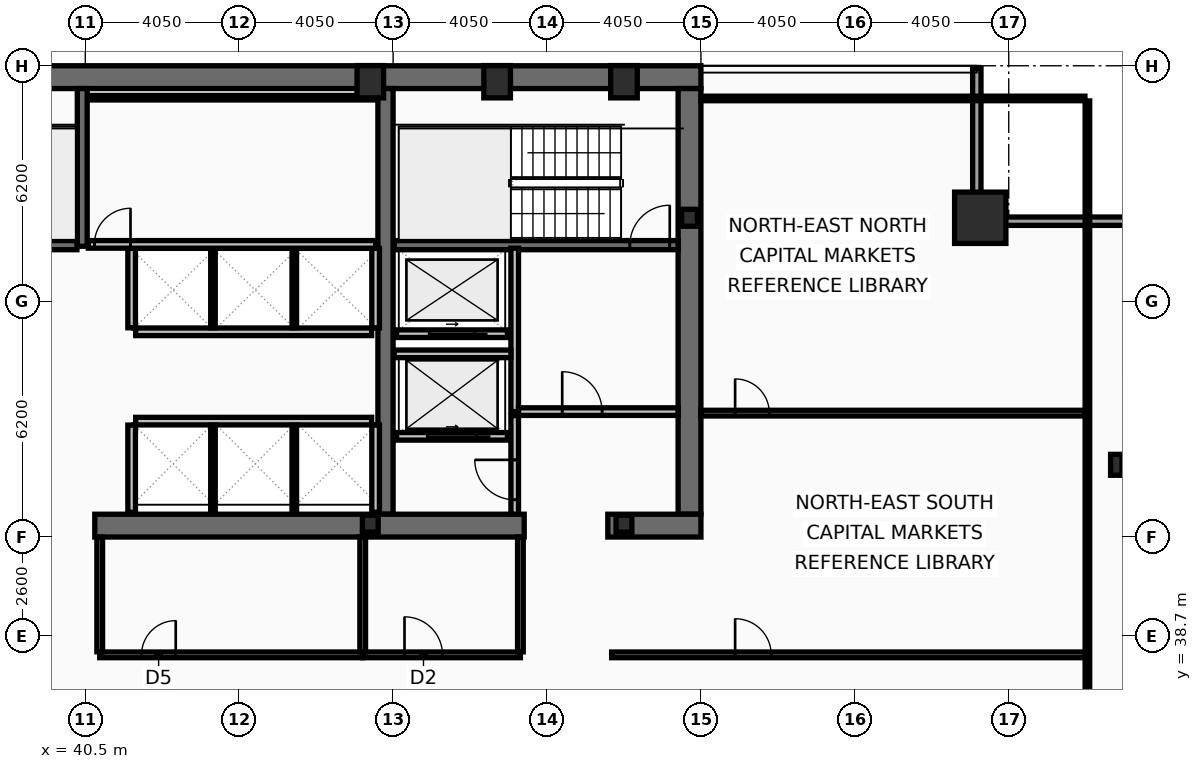
"""IFC4 building model, lengths in metres.
Left out: names, types, materials, properties, quantities, classifications, styles, units other than length and angle.
Written with IfcOpenShell. Run it as: python <this file> out.ifc"""

import sys

from ifc_helpers import new_model, si_unit, direction, frame, frame_2d, origin, origin_2d, place, context, subcontext, project, spatial, rectangle, hollow_rectangle, i_section, extrude, element, fill, save


model = new_model("IFC4")
c1 = context("Model", 3, precision=1e-05, world=origin(), true_north=direction((0.0, 1.0)))
c2 = subcontext(c1, "Body", "Model", "MODEL_VIEW")
j1 = project(units=[si_unit("LENGTHUNIT", "METRE"), si_unit("PLANEANGLEUNIT", "RADIAN")], contexts=[c1])
p1 = place(None, origin())
s1 = spatial("IfcSite", under=j1, at=p1, CompositionType="ELEMENT")
p2 = place(p1, origin())
s2 = spatial("IfcBuilding", under=s1, at=p2, CompositionType="ELEMENT")
p3 = place(p2, frame((0.0, 0.0, 177.0)))
s3 = spatial("IfcBuildingStorey", under=s2, at=p3, CompositionType="ELEMENT", Elevation=177.0)
p4 = place(p3, frame((16.2, 53.4, 0.0), z_axis=(0.0, 0.0, 1.0), x_axis=(1.0, 0.0, 0.0)))
e1 = element("IfcWall", 1, at=p4, inside=s3, PredefinedType="SHEAR", context=c2, shape_type="SweptSolid", body=[
    extrude(rectangle(XDim=40.5, YDim=0.6, at=frame_2d((20.25, 0.0))), origin(), (0.0, 0.0, 1.0), 3.44),
])
p5 = place(p3, frame((56.4, 53.1, 0.0), z_axis=(0.0, 0.0, 1.0), x_axis=(0.0, -1.0, 0.0)))
e2 = element("IfcWall", 2, at=p5, inside=s3, PredefinedType="SHEAR", context=c2, shape_type="SweptSolid", body=[
    extrude(rectangle(XDim=11.2, YDim=0.6, at=frame_2d((5.6, 0.0))), origin(), (0.0, 0.0, 1.0), 3.44),
])
p6 = place(p3, frame((48.4, 41.9, 0.0), z_axis=(0.0, 0.0, 1.0), x_axis=(0.0, 1.0, 0.0)))
e3 = element("IfcWall", 3, at=p6, inside=s3, PredefinedType="SHEAR", context=c2, shape_type="SweptSolid", body=[
    extrude(rectangle(XDim=11.2, YDim=0.4, at=frame_2d((5.6, 0.0))), origin(), (0.0, 0.0, 1.0), 3.44),
])
p7 = place(p3, frame((52.05, 41.6, 0.0), z_axis=(0.0, 0.0, 1.0), x_axis=(-1.0, 0.0, 0.0)))
e4 = element("IfcWall", 4, at=p7, inside=s3, PredefinedType="SHEAR", context=c2, shape_type="SweptSolid", body=[
    extrude(rectangle(XDim=11.3, YDim=0.6, at=frame_2d((5.65, 0.0))), origin(), (0.0, 0.0, 1.0), 3.44),
])
p8 = place(p3, frame((56.7, 41.6, 0.0), z_axis=(0.0, 0.0, 1.0), x_axis=(-1.0, 0.0, 0.0)))
e5 = element("IfcWall", 5, at=p8, inside=s3, PredefinedType="SHEAR", context=c2, shape_type="SweptSolid", body=[
    extrude(rectangle(XDim=2.45, YDim=0.6, at=frame_2d((1.225, 0.0))), origin(), (0.0, 0.0, 1.0), 3.44),
])
p9 = place(p3, frame((40.42, 48.95, 0.0), z_axis=(0.0, 0.0, 1.0), x_axis=(0.0, 1.0, 0.0)))
e6 = element("IfcWall", 6, at=p9, inside=s3, PredefinedType="SHEAR", context=c2, shape_type="SweptSolid", body=[
    extrude(rectangle(XDim=4.15, YDim=0.26, at=frame_2d((2.075, 0.0))), origin(), (0.0, 0.0, 1.0), 3.44),
])
p10 = place(p3, frame((48.63, 48.98, 0.0), z_axis=(0.0, 0.0, 1.0), x_axis=(1.0, 0.0, 0.0)))
e7 = element("IfcWall", 7, at=p10, inside=s3, PredefinedType="SHEAR", context=c2, shape_type="SweptSolid", body=[
    extrude(rectangle(XDim=7.47, YDim=0.24, at=frame_2d((3.735, 0.0))), origin(), (0.0, 0.0, 1.0), 3.44),
])
p11 = place(p10, frame((6.2, 0.0, 0.0)))
e8 = element("IfcOpeningElement", 8, at=p11, cuts=e7, PredefinedType="OPENING", context=c2, shape_type="SweptSolid", body=[
    extrude(rectangle(XDim=1.05, YDim=2.15, at=frame_2d((0.525, 1.075))), frame((0.0, 0.13, 0.0), z_axis=(0.0, -1.0, 0.0), x_axis=(1.0, 0.0, 0.0)), (0.0, 0.0, 1.0), 0.26),
])
p12 = place(p3, frame((32.72, 48.98, 0.0), z_axis=(0.0, 0.0, 1.0), x_axis=(1.0, 0.0, 0.0)))
e9 = element("IfcWall", 9, at=p12, inside=s3, PredefinedType="SHEAR", context=c2, shape_type="SweptSolid", body=[
    extrude(rectangle(XDim=7.56, YDim=0.24, at=frame_2d((3.78, 0.0))), origin(), (0.0, 0.0, 1.0), 3.44),
])
p13 = place(p12, frame((0.22, 0.0, 0.0)))
e10 = element("IfcOpeningElement", 10, at=p13, cuts=e9, PredefinedType="OPENING", context=c2, shape_type="SweptSolid", body=[
    extrude(rectangle(XDim=1.05, YDim=2.15, at=frame_2d((0.525, 1.075))), frame((0.0, 0.13, 0.0), z_axis=(0.0, -1.0, 0.0), x_axis=(1.0, 0.0, 0.0)), (0.0, 0.0, 1.0), 0.26),
])
p14 = place(p3, frame((64.05, 49.7, 0.0), z_axis=(0.0, 0.0, 1.0), x_axis=(1.0, 0.0, 0.0)))
e11 = element("IfcColumn", 11, at=p14, inside=s3, PredefinedType="COLUMN", context=c2, shape_type="SweptSolid", body=[
    extrude(hollow_rectangle(XDim=1.35, YDim=1.35, WallThickness=0.065, at=origin_2d()), origin(), (0.0, 0.0, 1.0), 3.6),
])
for number, where, z_axis, x_axis in (
    (12, (48.0, 53.28, 0.0), (0.0, 0.0, 1.0), (1.0, 0.0, 0.0)),
    (13, (51.337, 53.28, 0.0), (0.0, 0.0, 1.0), (1.0, 0.0, 0.0)),
    (14, (54.675, 53.28, 0.0), (0.0, 0.0, 1.0), (1.0, 0.0, 0.0)),
):
    element("IfcColumn", number, at=place(p3, frame(where, z_axis=z_axis, x_axis=x_axis)), inside=s3, PredefinedType="COLUMN", context=c2, shape_type="SweptSolid", body=[
        extrude(hollow_rectangle(XDim=0.7, YDim=0.85, WallThickness=0.05, at=origin_2d()), origin(), (0.0, 0.0, 1.0), 3.6),
    ])
p15 = place(p3, frame((67.63, 43.2, 0.0), z_axis=(0.0, 0.0, 1.0), x_axis=(1.0, 0.0, 0.0)))
e15 = element("IfcColumn", 15, at=p15, inside=s3, PredefinedType="COLUMN", context=c2, shape_type="SweptSolid", body=[
    extrude(i_section(OverallWidth=0.3, OverallDepth=0.55, WebThickness=0.015, FlangeThickness=0.029, at=origin_2d()), origin(), (0.0, 0.0, 1.0), 3.6),
])
for number, where, z_axis, x_axis in (
    (16, (56.4, 49.7, 0.0), (0.0, 0.0, 1.0), (1.0, 0.0, 0.0)),
    (17, (48.0, 41.65, 0.0), (0.0, 0.0, 1.0), (1.0, 0.0, 0.0)),
    (18, (54.675, 41.65, 0.0), (0.0, 0.0, 1.0), (1.0, 0.0, 0.0)),
):
    element("IfcColumn", number, at=place(p3, frame(where, z_axis=z_axis, x_axis=x_axis)), inside=s3, PredefinedType="COLUMN", context=c2, shape_type="SweptSolid", body=[
        extrude(i_section(OverallWidth=0.416, OverallDepth=0.446, WebThickness=0.039, FlangeThickness=0.063, at=origin_2d()), origin(), (0.0, 0.0, 1.0), 3.6),
    ])
p16 = place(p3, frame((63.96, 53.63, 0.0), z_axis=(0.0, 0.0, 1.0), x_axis=(0.0, -1.0, 0.0)))
e19 = element("IfcWall", 19, at=p16, inside=s3, PredefinedType="SOLIDWALL", context=c2, shape_type="SweptSolid", body=[
    extrude(rectangle(XDim=3.91, YDim=0.22, at=frame_2d((1.955, 0.0))), origin(), (0.0, 0.0, 1.0), 2.83),
])
p17 = place(p3, frame((63.85, 49.61, 0.0), z_axis=(0.0, 0.0, 1.0), x_axis=(1.0, 0.0, 0.0)))
e20 = element("IfcWall", 20, at=p17, inside=s3, PredefinedType="SOLIDWALL", context=c2, shape_type="SweptSolid", body=[
    extrude(rectangle(XDim=4.22, YDim=0.22, at=frame_2d((2.11, 0.0))), origin(), (0.0, 0.0, 1.0), 2.83),
])
p18 = place(p3, frame((51.61, 43.95, 0.0), z_axis=(0.0, 0.0, 1.0), x_axis=(-1.0, 0.0, 0.0)))
e21 = element("IfcWall", 21, at=p18, inside=s3, PredefinedType="PARTITIONING", context=c2, shape_type="SweptSolid", body=[
    extrude(rectangle(XDim=2.92, YDim=0.2, at=frame_2d((1.46, 0.0))), origin(), (0.0, 0.0, 1.0), 3.44),
])
p19 = place(p18, frame((0.81, 0.0, 0.0)))
e22 = element("IfcOpeningElement", 22, at=p19, cuts=e21, PredefinedType="OPENING", context=c2, shape_type="SweptSolid", body=[
    extrude(rectangle(XDim=1.3, YDim=2.18, at=frame_2d((0.65, 1.09))), frame((0.0, 0.11, 0.0), z_axis=(0.0, -1.0, 0.0), x_axis=(1.0, 0.0, 0.0)), (0.0, 0.0, 1.0), 0.22),
])
p20 = place(p3, frame((51.61, 46.65, 0.0), z_axis=(0.0, 0.0, 1.0), x_axis=(-1.0, 0.0, 0.0)))
e23 = element("IfcWall", 23, at=p20, inside=s3, PredefinedType="PARTITIONING", context=c2, shape_type="SweptSolid", body=[
    extrude(rectangle(XDim=2.92, YDim=0.2, at=frame_2d((1.46, 0.0))), origin(), (0.0, 0.0, 1.0), 3.44),
])
p21 = place(p20, frame((0.86, 0.0, 0.0)))
e24 = element("IfcOpeningElement", 24, at=p21, cuts=e23, PredefinedType="OPENING", context=c2, shape_type="SweptSolid", body=[
    extrude(rectangle(XDim=1.2, YDim=2.18, at=frame_2d((0.6, 1.09))), frame((0.0, 0.11, 0.0), z_axis=(0.0, -1.0, 0.0), x_axis=(1.0, 0.0, 0.0)), (0.0, 0.0, 1.0), 0.22),
])
p22 = place(p3, frame((51.8, 44.6, 0.0), z_axis=(0.0, 0.0, 1.0), x_axis=(0.0, 1.0, 0.0)))
e25 = element("IfcWall", 25, at=p22, inside=s3, PredefinedType="PARTITIONING", context=c2, shape_type="SweptSolid", body=[
    extrude(rectangle(XDim=4.3, YDim=0.2, at=frame_2d((2.15, 0.0))), origin(), (0.0, 0.0, 1.0), 3.44),
])
p23 = place(p3, frame((51.9, 44.6, 0.0), z_axis=(0.0, 0.0, 1.0), x_axis=(1.0, 0.0, 0.0)))
e26 = element("IfcWall", 26, at=p23, inside=s3, PredefinedType="PARTITIONING", context=c2, shape_type="SweptSolid", body=[
    extrude(rectangle(XDim=4.2, YDim=0.2, at=frame_2d((2.1, 0.0))), origin(), (0.0, 0.0, 1.0), 3.44),
])
p24 = place(p23, frame((1.15, 0.0, 0.0)))
e27 = element("IfcOpeningElement", 27, at=p24, cuts=e26, PredefinedType="OPENING", context=c2, shape_type="SweptSolid", body=[
    extrude(rectangle(XDim=1.05, YDim=2.15, at=frame_2d((0.525, 1.075))), frame((0.0, 0.11, 0.0), z_axis=(0.0, -1.0, 0.0), x_axis=(1.0, 0.0, 0.0)), (0.0, 0.0, 1.0), 0.22),
])
p25 = place(p3, frame((48.63, 46.12, 0.0), z_axis=(0.0, 0.0, 1.0), x_axis=(1.0, 0.0, 0.0)))
e28 = element("IfcWall", 28, at=p25, inside=s3, PredefinedType="PARTITIONING", context=c2, shape_type="SweptSolid", body=[
    extrude(rectangle(XDim=3.07, YDim=0.2, at=frame_2d((1.535, 0.0))), origin(), (0.0, 0.0, 1.0), 3.44),
])
p26 = place(p3, frame((51.8, 41.9, 0.0), z_axis=(0.0, 0.0, 1.0), x_axis=(0.0, 1.0, 0.0)))
e29 = element("IfcWall", 29, at=p26, inside=s3, PredefinedType="PARTITIONING", context=c2, shape_type="SweptSolid", body=[
    extrude(rectangle(XDim=2.595, YDim=0.2, at=frame_2d((1.298, 0.0))), origin(), (0.0, 0.0, 1.0), 3.44),
])
p27 = place(p26, frame((0.38, 0.0, 0.0)))
e30 = element("IfcOpeningElement", 30, at=p27, cuts=e29, PredefinedType="OPENING", context=c2, shape_type="SweptSolid", body=[
    extrude(rectangle(XDim=1.05, YDim=2.15, at=frame_2d((0.525, 1.075))), frame((0.0, 0.11, 0.0), z_axis=(0.0, -1.0, 0.0), x_axis=(1.0, 0.0, 0.0)), (0.0, 0.0, 1.0), 0.22),
])
p28 = place(p3, frame((41.825, 46.7, 0.0), z_axis=(0.0, 0.0, 1.0), x_axis=(1.0, 0.0, 0.0)))
e31 = element("IfcWall", 31, at=p28, inside=s3, PredefinedType="PARTITIONING", context=c2, shape_type="SweptSolid", body=[
    extrude(rectangle(XDim=6.21, YDim=0.2, at=frame_2d((3.105, 0.0))), origin(), (0.0, 0.0, 1.0), 3.44),
])
for number, where, z_axis, x_axis in (
    (32, (41.72, 46.805, 0.0), (0.0, 0.0, 1.0), (0.0, 1.0, 0.0)),
    (33, (48.14, 46.805, 0.0), (0.0, 0.0, 1.0), (0.0, 1.0, 0.0)),
):
    element("IfcWall", number, at=place(p3, frame(where, z_axis=z_axis, x_axis=x_axis)), inside=s3, PredefinedType="PARTITIONING", context=c2, shape_type="SweptSolid", body=[
        extrude(rectangle(XDim=2.09, YDim=0.2, at=frame_2d((1.045, 0.0))), origin(), (0.0, 0.0, 1.0), 3.44),
    ])
for number, where, z_axis, x_axis in (
    (34, (43.86, 46.805, 0.0), (0.0, 0.0, 1.0), (0.0, 1.0, 0.0)),
    (35, (46.0, 46.805, 0.0), (0.0, 0.0, 1.0), (0.0, 1.0, 0.0)),
):
    element("IfcWall", number, at=place(p3, frame(where, z_axis=z_axis, x_axis=x_axis)), inside=s3, PredefinedType="PARTITIONING", context=c2, shape_type="SweptSolid", body=[
        extrude(rectangle(XDim=2.09, YDim=0.12, at=frame_2d((1.045, 0.0))), origin(), (0.0, 0.0, 1.0), 3.44),
    ])
p29 = place(p3, frame((41.825, 44.35, 0.0), z_axis=(0.0, 0.0, 1.0), x_axis=(1.0, 0.0, 0.0)))
e36 = element("IfcWall", 36, at=p29, inside=s3, PredefinedType="PARTITIONING", context=c2, shape_type="SweptSolid", body=[
    extrude(rectangle(XDim=6.21, YDim=0.2, at=frame_2d((3.105, 0.0))), origin(), (0.0, 0.0, 1.0), 3.44),
])
for number, where, z_axis, x_axis in (
    (37, (41.72, 41.95, 0.0), (0.0, 0.0, 1.0), (0.0, 1.0, 0.0)),
    (38, (48.14, 41.95, 0.0), (0.0, 0.0, 1.0), (0.0, 1.0, 0.0)),
):
    element("IfcWall", number, at=place(p3, frame(where, z_axis=z_axis, x_axis=x_axis)), inside=s3, PredefinedType="PARTITIONING", context=c2, shape_type="SweptSolid", body=[
        extrude(rectangle(XDim=2.295, YDim=0.2, at=frame_2d((1.147, 0.0))), origin(), (0.0, 0.0, 1.0), 3.44),
    ])
for number, where, z_axis, x_axis in (
    (39, (43.86, 41.95, 0.0), (0.0, 0.0, 1.0), (0.0, 1.0, 0.0)),
    (40, (46.0, 41.95, 0.0), (0.0, 0.0, 1.0), (0.0, 1.0, 0.0)),
):
    element("IfcWall", number, at=place(p3, frame(where, z_axis=z_axis, x_axis=x_axis)), inside=s3, PredefinedType="PARTITIONING", context=c2, shape_type="SweptSolid", body=[
        extrude(rectangle(XDim=2.295, YDim=0.12, at=frame_2d((1.147, 0.0))), origin(), (0.0, 0.0, 1.0), 3.44),
    ])
p30 = place(p3, frame((40.58, 52.86, 0.0), z_axis=(0.0, 0.0, 1.0), x_axis=(1.0, 0.0, 0.0)))
e41 = element("IfcWall", 41, at=p30, inside=s3, PredefinedType="PARTITIONING", context=c2, shape_type="SweptSolid", body=[
    extrude(rectangle(XDim=7.56, YDim=0.12, at=frame_2d((3.78, 0.0))), origin(), (0.0, 0.0, 1.0), 3.44),
])
p31 = place(p3, frame((40.58, 49.0, 0.0), z_axis=(0.0, 0.0, 1.0), x_axis=(1.0, 0.0, 0.0)))
e42 = element("IfcWall", 42, at=p31, inside=s3, PredefinedType="PARTITIONING", context=c2, shape_type="SweptSolid", body=[
    extrude(rectangle(XDim=7.56, YDim=0.2, at=frame_2d((3.78, 0.0))), origin(), (0.0, 0.0, 1.0), 3.44),
])
p32 = place(p31, frame((0.16, 0.0, 0.0)))
e43 = element("IfcOpeningElement", 43, at=p32, cuts=e42, PredefinedType="OPENING", context=c2, shape_type="SweptSolid", body=[
    extrude(rectangle(XDim=0.95, YDim=2.1, at=frame_2d((0.475, 1.05))), frame((0.0, 0.11, 0.0), z_axis=(0.0, -1.0, 0.0), x_axis=(1.0, 0.0, 0.0)), (0.0, 0.0, 1.0), 0.22),
])
p33 = place(p3, frame((40.88, 38.2, 0.0), z_axis=(0.0, 0.0, 1.0), x_axis=(1.0, 0.0, 0.0)))
e44 = element("IfcWall", 44, at=p33, inside=s3, PredefinedType="PARTITIONING", context=c2, shape_type="SweptSolid", body=[
    extrude(rectangle(XDim=6.92, YDim=0.15, at=frame_2d((3.46, 0.0))), origin(), (0.0, 0.0, 1.0), 2.73),
])
p34 = place(p33, frame((1.1, 0.0, 0.0)))
e45 = element("IfcOpeningElement", 45, at=p34, cuts=e44, PredefinedType="OPENING", context=c2, shape_type="SweptSolid", body=[
    extrude(rectangle(XDim=0.9, YDim=2.05, at=frame_2d((0.45, 1.025))), frame((0.0, 0.085, 0.0), z_axis=(0.0, -1.0, 0.0), x_axis=(1.0, 0.0, 0.0)), (0.0, 0.0, 1.0), 0.17),
])
p35 = place(p3, frame((47.8, 38.2, 0.0), z_axis=(0.0, 0.0, 1.0), x_axis=(1.0, 0.0, 0.0)))
e46 = element("IfcWall", 46, at=p35, inside=s3, PredefinedType="PARTITIONING", context=c2, shape_type="SweptSolid", body=[
    extrude(rectangle(XDim=4.15, YDim=0.15, at=frame_2d((2.075, 0.0))), origin(), (0.0, 0.0, 1.0), 2.73),
])
p36 = place(p35, frame((1.1, 0.0, 0.0)))
e47 = element("IfcOpeningElement", 47, at=p36, cuts=e46, PredefinedType="OPENING", context=c2, shape_type="SweptSolid", body=[
    extrude(rectangle(XDim=1.0, YDim=2.05, at=frame_2d((0.5, 1.025))), frame((0.0, 0.085, 0.0), z_axis=(0.0, -1.0, 0.0), x_axis=(1.0, 0.0, 0.0)), (0.0, 0.0, 1.0), 0.17),
])
p37 = place(p3, frame((40.88, 38.28, 0.0), z_axis=(0.0, 0.0, 1.0), x_axis=(0.0, 1.0, 0.0)))
e48 = element("IfcWall", 48, at=p37, inside=s3, PredefinedType="PARTITIONING", context=c2, shape_type="SweptSolid", body=[
    extrude(rectangle(XDim=3.02, YDim=0.15, at=frame_2d((1.51, 0.0))), origin(), (0.0, 0.0, 1.0), 3.44),
])
p38 = place(p3, frame((47.8, 38.28, 0.0), z_axis=(0.0, 0.0, 1.0), x_axis=(0.0, 1.0, 0.0)))
e49 = element("IfcWall", 49, at=p38, inside=s3, PredefinedType="PARTITIONING", context=c2, shape_type="SweptSolid", body=[
    extrude(rectangle(XDim=3.02, YDim=0.15, at=frame_2d((1.51, 0.0))), origin(), (0.0, 0.0, 1.0), 2.73),
])
p39 = place(p3, frame((51.95, 38.28, 0.0), z_axis=(0.0, 0.0, 1.0), x_axis=(0.0, 1.0, 0.0)))
e50 = element("IfcWall", 50, at=p39, inside=s3, PredefinedType="PARTITIONING", context=c2, shape_type="SweptSolid", body=[
    extrude(rectangle(XDim=3.02, YDim=0.15, at=frame_2d((1.51, 0.0))), origin(), (0.0, 0.0, 1.0), 3.44),
])
p40 = place(p3, frame((54.35, 38.2, 0.0), z_axis=(0.0, 0.0, 1.0), x_axis=(1.0, 0.0, 0.0)))
e51 = element("IfcWall", 51, at=p40, inside=s3, PredefinedType="PARTITIONING", context=c2, shape_type="SweptSolid", body=[
    extrude(rectangle(XDim=12.52, YDim=0.15, at=frame_2d((6.26, 0.0))), origin(), (0.0, 0.0, 1.0), 2.73),
])
p41 = place(p40, frame((3.25, 0.0, 0.0)))
e52 = element("IfcOpeningElement", 52, at=p41, cuts=e51, PredefinedType="OPENING", context=c2, shape_type="SweptSolid", body=[
    extrude(rectangle(XDim=0.95, YDim=2.05, at=frame_2d((0.475, 1.025))), frame((0.0, 0.085, 0.0), z_axis=(0.0, -1.0, 0.0), x_axis=(1.0, 0.0, 0.0)), (0.0, 0.0, 1.0), 0.17),
])
p42 = place(p3, frame((56.7, 44.56, 0.0), z_axis=(0.0, 0.0, 1.0), x_axis=(1.0, 0.0, 0.0)))
e53 = element("IfcWall", 53, at=p42, inside=s3, PredefinedType="PARTITIONING", context=c2, shape_type="SweptSolid", body=[
    extrude(rectangle(XDim=10.105, YDim=0.15, at=frame_2d((5.052, 0.0))), origin(), (0.0, 0.0, 1.0), 2.83),
])
p43 = place(p42, frame((0.9, 0.0, 0.0)))
e54 = element("IfcOpeningElement", 54, at=p43, cuts=e53, PredefinedType="OPENING", context=c2, shape_type="SweptSolid", body=[
    extrude(rectangle(XDim=0.9, YDim=2.05, at=frame_2d((0.45, 1.025))), frame((0.0, 0.085, 0.0), z_axis=(0.0, -1.0, 0.0), x_axis=(1.0, 0.0, 0.0)), (0.0, 0.0, 1.0), 0.17),
])
p44 = place(p3, frame((66.87, 10.665, 0.0), z_axis=(0.0, 0.0, 1.0), x_axis=(0.0, 1.0, 0.0)))
e55 = element("IfcWall", 55, at=p44, inside=s3, PredefinedType="PARTITIONING", context=c2, shape_type="SweptSolid", body=[
    extrude(rectangle(XDim=42.11, YDim=0.12, at=frame_2d((21.055, 0.0))), origin(), (0.0, 0.0, 1.0), 2.73),
])
p45 = place(p3, frame((56.7, 52.84, 0.0), z_axis=(0.0, 0.0, 1.0), x_axis=(1.0, 0.0, 0.0)))
e56 = element("IfcWall", 56, at=p45, inside=s3, PredefinedType="PARTITIONING", context=c2, shape_type="SweptSolid", body=[
    extrude(rectangle(XDim=10.105, YDim=0.12, at=frame_2d((5.052, 0.0))), origin(), (0.0, 0.0, 1.0), 3.44),
])
p46 = place(p11, origin())
e57 = element("IfcDoor", 57, at=p46, inside=s3, OperationType="SINGLE_SWING_RIGHT", PredefinedType="DOOR", context=c2, shape_type="SweptSolid", body=[
    extrude(rectangle(XDim=1.05, YDim=2.15, at=frame_2d((0.525, 1.075))), frame((0.0, 0.025, 0.0), z_axis=(0.0, -1.0, 0.0), x_axis=(1.0, 0.0, 0.0)), (0.0, 0.0, 1.0), 0.05),
])
fill(e8, e57)
p47 = place(p19, origin())
e58 = element("IfcDoor", 58, at=p47, inside=s3, OperationType="SLIDING_TO_LEFT", PredefinedType="DOOR", context=c2, shape_type="SweptSolid", body=[
    extrude(rectangle(XDim=1.3, YDim=2.18, at=frame_2d((0.65, 1.09))), frame((0.0, 0.025, 0.0), z_axis=(0.0, -1.0, 0.0), x_axis=(1.0, 0.0, 0.0)), (0.0, 0.0, 1.0), 0.05),
])
fill(e22, e58)
p48 = place(p21, origin())
e59 = element("IfcDoor", 59, at=p48, inside=s3, OperationType="SLIDING_TO_LEFT", PredefinedType="DOOR", context=c2, shape_type="SweptSolid", body=[
    extrude(rectangle(XDim=1.2, YDim=2.18, at=frame_2d((0.6, 1.09))), frame((0.0, 0.025, 0.0), z_axis=(0.0, -1.0, 0.0), x_axis=(1.0, 0.0, 0.0)), (0.0, 0.0, 1.0), 0.05),
])
fill(e24, e59)
p49 = place(p24, origin())
e60 = element("IfcDoor", 60, at=p49, inside=s3, OperationType="SINGLE_SWING_LEFT", PredefinedType="DOOR", context=c2, shape_type="SweptSolid", body=[
    extrude(rectangle(XDim=1.05, YDim=2.15, at=frame_2d((0.525, 1.075))), frame((0.0, 0.025, 0.0), z_axis=(0.0, -1.0, 0.0), x_axis=(1.0, 0.0, 0.0)), (0.0, 0.0, 1.0), 0.05),
])
fill(e27, e60)
p50 = place(p27, origin())
e61 = element("IfcDoor", 61, at=p50, inside=s3, OperationType="SINGLE_SWING_RIGHT", PredefinedType="DOOR", context=c2, shape_type="SweptSolid", body=[
    extrude(rectangle(XDim=1.05, YDim=2.15, at=frame_2d((0.525, 1.075))), frame((0.0, 0.025, 0.0), z_axis=(0.0, -1.0, 0.0), x_axis=(1.0, 0.0, 0.0)), (0.0, 0.0, 1.0), 0.05),
])
fill(e30, e61)
p51 = place(p32, origin())
e62 = element("IfcDoor", 62, at=p51, inside=s3, OperationType="SINGLE_SWING_RIGHT", PredefinedType="DOOR", context=c2, shape_type="SweptSolid", body=[
    extrude(rectangle(XDim=0.95, YDim=2.1, at=frame_2d((0.475, 1.05))), frame((0.0, 0.025, 0.0), z_axis=(0.0, -1.0, 0.0), x_axis=(1.0, 0.0, 0.0)), (0.0, 0.0, 1.0), 0.05),
])
fill(e43, e62)
p52 = place(p34, origin())
e63 = element("IfcDoor", 63, at=p52, inside=s3, OperationType="SINGLE_SWING_RIGHT", PredefinedType="DOOR", context=c2, shape_type="SweptSolid", body=[
    extrude(rectangle(XDim=0.9, YDim=2.05, at=frame_2d((0.45, 1.025))), frame((0.0, 0.025, 0.0), z_axis=(0.0, -1.0, 0.0), x_axis=(1.0, 0.0, 0.0)), (0.0, 0.0, 1.0), 0.05),
])
fill(e45, e63)
p53 = place(p36, origin())
e64 = element("IfcDoor", 64, at=p53, inside=s3, OperationType="SINGLE_SWING_LEFT", PredefinedType="DOOR", context=c2, shape_type="SweptSolid", body=[
    extrude(rectangle(XDim=1.0, YDim=2.05, at=frame_2d((0.5, 1.025))), frame((0.0, 0.025, 0.0), z_axis=(0.0, -1.0, 0.0), x_axis=(1.0, 0.0, 0.0)), (0.0, 0.0, 1.0), 0.05),
])
fill(e47, e64)
p54 = place(p41, origin())
e65 = element("IfcDoor", 65, at=p54, inside=s3, OperationType="SINGLE_SWING_LEFT", PredefinedType="DOOR", context=c2, shape_type="SweptSolid", body=[
    extrude(rectangle(XDim=0.95, YDim=2.05, at=frame_2d((0.475, 1.025))), frame((0.0, 0.025, 0.0), z_axis=(0.0, -1.0, 0.0), x_axis=(1.0, 0.0, 0.0)), (0.0, 0.0, 1.0), 0.05),
])
fill(e52, e65)
p55 = place(p43, origin())
e66 = element("IfcDoor", 66, at=p55, inside=s3, OperationType="SINGLE_SWING_LEFT", PredefinedType="DOOR", context=c2, shape_type="SweptSolid", body=[
    extrude(rectangle(XDim=0.9, YDim=2.05, at=frame_2d((0.45, 1.025))), frame((0.0, 0.025, 0.0), z_axis=(0.0, -1.0, 0.0), x_axis=(1.0, 0.0, 0.0)), (0.0, 0.0, 1.0), 0.05),
])
fill(e54, e66)
save(model, sys.argv[1])
